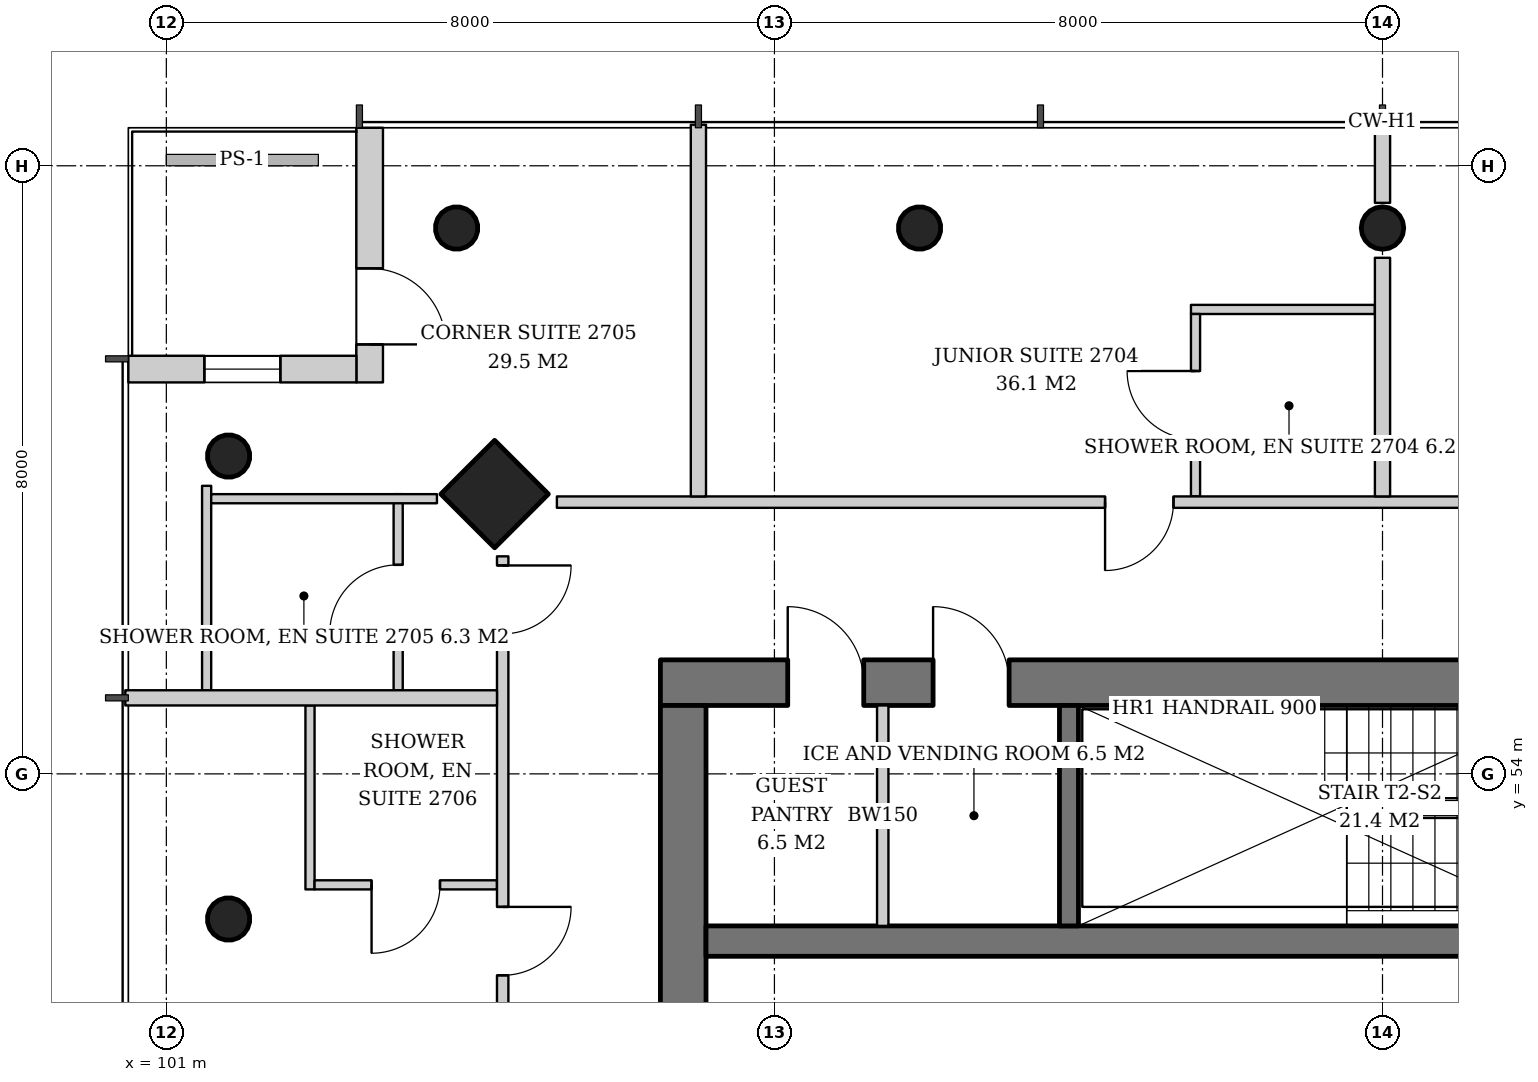
"""IFC4 building model, lengths in metres.
Left out: names, types, materials, properties, quantities, classifications, styles, units other than length and angle.
Written with IfcOpenShell. Run it as: python <this file> out.ifc"""

import sys

from ifc_helpers import new_model, si_unit, direction, frame, frame_2d, origin, origin_2d, place, context, subcontext, project, spatial, rectangle, hollow_circle, extrude, element, fill, save


model = new_model("IFC4")
c1 = context("Model", 3, precision=1e-05, world=origin(), true_north=direction((0.0, 1.0)))
c2 = subcontext(c1, "Body", "Model", "MODEL_VIEW")
j1 = project(units=[si_unit("LENGTHUNIT", "METRE"), si_unit("PLANEANGLEUNIT", "RADIAN")], contexts=[c1])
p1 = place(None, origin())
s1 = spatial("IfcSite", under=j1, at=p1, CompositionType="ELEMENT")
p2 = place(p1, origin())
s2 = spatial("IfcBuilding", under=s1, at=p2, CompositionType="ELEMENT")
p3 = place(p2, frame((0.0, 0.0, 108.4)))
s3 = spatial("IfcBuildingStorey", under=s2, at=p3, CompositionType="ELEMENT", Elevation=108.4)
p4 = place(p3, frame((105.267, 57.733, 0.0), z_axis=(0.043029647111, -0.043029647111, 0.998146732169), x_axis=(0.707106781187, 0.707106781187, 0.0)))
e1 = element("IfcColumn", 1, at=p4, inside=s3, PredefinedType="COLUMN", context=c2, shape_type="SweptSolid", body=[
    extrude(rectangle(XDim=1.0, YDim=1.0, at=origin_2d()), origin(), (0.0, 0.0, 1.0), 3.807),
])
p5 = place(p3, frame((104.767, 61.233, 0.0), z_axis=(0.043029647111, -0.043029647111, 0.998146732169), x_axis=(0.707106781187, 0.707106781187, 0.0)))
e2 = element("IfcColumn", 2, at=p5, inside=s3, PredefinedType="COLUMN", context=c2, shape_type="SweptSolid", body=[
    extrude(hollow_circle(Radius=0.28, WallThickness=0.02, at=origin_2d()), origin(), (0.0, 0.0, 1.0), 3.807),
])
p6 = place(p3, frame((117.0, 61.233, 0.0), z_axis=(0.0, -0.043069538298, 0.999072076915), x_axis=(1.0, 0.0, 0.0)))
e3 = element("IfcColumn", 3, at=p6, inside=s3, PredefinedType="COLUMN", context=c2, shape_type="SweptSolid", body=[
    extrude(hollow_circle(Radius=0.28, WallThickness=0.02, at=origin_2d()), origin(), (0.0, 0.0, 1.0), 3.803),
])
p7 = place(p3, frame((110.884, 61.233, 0.0), z_axis=(0.021561848751, -0.043059525333, 0.998839808957), x_axis=(0.894160516368, 0.44774654769, 0.0)))
e4 = element("IfcColumn", 4, at=p7, inside=s3, PredefinedType="COLUMN", context=c2, shape_type="SweptSolid", body=[
    extrude(hollow_circle(Radius=0.28, WallThickness=0.02, at=origin_2d()), origin(), (0.0, 0.0, 1.0), 3.804),
])
p8 = place(p3, frame((101.767, 58.233, 0.0), z_axis=(0.043029647111, -0.043029647111, 0.998146732169), x_axis=(0.707106781187, 0.707106781187, 0.0)))
e5 = element("IfcColumn", 5, at=p8, inside=s3, PredefinedType="COLUMN", context=c2, shape_type="SweptSolid", body=[
    extrude(hollow_circle(Radius=0.28, WallThickness=0.02, at=origin_2d()), origin(), (0.0, 0.0, 1.0), 3.807),
])
p9 = place(p3, frame((101.767, 52.116, 0.0), z_axis=(0.043059525333, -0.021561848751, 0.998839808957), x_axis=(0.44774654769, 0.894160516368, 0.0)))
e6 = element("IfcColumn", 6, at=p9, inside=s3, PredefinedType="COLUMN", context=c2, shape_type="SweptSolid", body=[
    extrude(hollow_circle(Radius=0.28, WallThickness=0.02, at=origin_2d()), origin(), (0.0, 0.0, 1.0), 3.804),
])
p10 = place(p3, frame((107.5, 55.2, 0.0), z_axis=(0.0, 0.0, 1.0), x_axis=(1.0, 0.0, 0.0)))
e7 = element("IfcWall", 7, at=p10, inside=s3, PredefinedType="SHEAR", context=c2, shape_type="SweptSolid", body=[
    extrude(rectangle(XDim=19.0, YDim=0.6, at=frame_2d((9.5, 0.0))), origin(), (0.0, 0.0, 1.0), 3.8),
])
p11 = place(p10, frame((14.14, 0.0, 0.0)))
e8 = element("IfcOpeningElement", 8, at=p11, cuts=e7, PredefinedType="OPENING", context=c2, shape_type="SweptSolid", body=[
    extrude(rectangle(XDim=1.0, YDim=2.1, at=frame_2d((0.5, 1.05))), frame((0.0, 0.31, 0.0), z_axis=(0.0, -1.0, 0.0), x_axis=(1.0, 0.0, 0.0)), (0.0, 0.0, 1.0), 0.62),
])
p12 = place(p10, frame((1.675, 0.0, 0.0)))
e9 = element("IfcOpeningElement", 9, at=p12, cuts=e7, PredefinedType="OPENING", context=c2, shape_type="SweptSolid", body=[
    extrude(rectangle(XDim=1.0, YDim=2.1, at=frame_2d((0.5, 1.05))), frame((0.0, 0.31, 0.0), z_axis=(0.0, -1.0, 0.0), x_axis=(1.0, 0.0, 0.0)), (0.0, 0.0, 1.0), 0.62),
])
p13 = place(p10, frame((3.587, 0.0, 0.0)))
e10 = element("IfcOpeningElement", 10, at=p13, cuts=e7, PredefinedType="OPENING", context=c2, shape_type="SweptSolid", body=[
    extrude(rectangle(XDim=1.0, YDim=2.1, at=frame_2d((0.5, 1.05))), frame((0.0, 0.31, 0.0), z_axis=(0.0, -1.0, 0.0), x_axis=(1.0, 0.0, 0.0)), (0.0, 0.0, 1.0), 0.62),
])
p14 = place(p3, frame((107.8, 37.1, 0.0), z_axis=(0.0, 0.0, 1.0), x_axis=(0.0, 1.0, 0.0)))
e11 = element("IfcWall", 11, at=p14, inside=s3, PredefinedType="SHEAR", context=c2, shape_type="SweptSolid", body=[
    extrude(rectangle(XDim=17.8, YDim=0.6, at=frame_2d((8.9, 0.0))), origin(), (0.0, 0.0, 1.0), 3.8),
])
p15 = place(p14, frame((8.0, 0.0, 0.0)))
e12 = element("IfcOpeningElement", 12, at=p15, cuts=e11, PredefinedType="OPENING", context=c2, shape_type="SweptSolid", body=[
    extrude(rectangle(XDim=1.8, YDim=2.4, at=frame_2d((0.9, 1.2))), frame((0.0, 0.31, 0.0), z_axis=(0.0, -1.0, 0.0), x_axis=(1.0, 0.0, 0.0)), (0.0, 0.0, 1.0), 0.62),
])
p16 = place(p3, frame((108.1, 51.8, 0.0), z_axis=(0.0, 0.0, 1.0), x_axis=(1.0, 0.0, 0.0)))
e13 = element("IfcWall", 13, at=p16, inside=s3, PredefinedType="SHEAR", context=c2, shape_type="SweptSolid", body=[
    extrude(rectangle(XDim=17.8, YDim=0.4, at=frame_2d((8.9, 0.0))), origin(), (0.0, 0.0, 1.0), 3.8),
])
p17 = place(p3, frame((103.675, 62.5, 0.0), z_axis=(0.0, 0.0, 1.0), x_axis=(0.0, -1.0, 0.0)))
e14 = element("IfcWall", 14, at=p17, inside=s3, PredefinedType="SOLIDWALL", context=c2, shape_type="SweptSolid", body=[
    extrude(rectangle(XDim=3.35, YDim=0.35, at=frame_2d((1.675, 0.0))), origin(), (0.0, 0.0, 1.0), 3.6),
])
p18 = place(p17, frame((1.85, 0.0, 0.0)))
e15 = element("IfcOpeningElement", 15, at=p18, cuts=e14, PredefinedType="OPENING", context=c2, shape_type="SweptSolid", body=[
    extrude(rectangle(XDim=1.0, YDim=2.4, at=frame_2d((0.5, 1.2))), frame((0.0, 0.185, 0.0), z_axis=(0.0, -1.0, 0.0), x_axis=(1.0, 0.0, 0.0)), (0.0, 0.0, 1.0), 0.37),
])
p19 = place(p3, frame((103.5, 59.325, 0.0), z_axis=(0.0, 0.0, 1.0), x_axis=(-1.0, 0.0, 0.0)))
e16 = element("IfcWall", 16, at=p19, inside=s3, PredefinedType="SOLIDWALL", context=c2, shape_type="SweptSolid", body=[
    extrude(rectangle(XDim=3.0, YDim=0.35, at=frame_2d((1.5, 0.0))), origin(), (0.0, 0.0, 1.0), 3.6),
])
p20 = place(p19, frame((1.0, 0.0, 0.9)))
e17 = element("IfcOpeningElement", 17, at=p20, cuts=e16, PredefinedType="OPENING", context=c2, shape_type="SweptSolid", body=[
    extrude(rectangle(XDim=1.0, YDim=2.4, at=frame_2d((0.5, 1.2))), frame((0.0, 0.185, 0.0), z_axis=(0.0, -1.0, 0.0), x_axis=(1.0, 0.0, 0.0)), (0.0, 0.0, 1.0), 0.37),
])
p21 = place(p3, frame((112.875, 52.0, 0.0), z_axis=(0.0, 0.0, 1.0), x_axis=(0.0, 1.0, 0.0)))
e18 = element("IfcWall", 18, at=p21, inside=s3, PredefinedType="SHEAR", context=c2, shape_type="SweptSolid", body=[
    extrude(rectangle(XDim=2.9, YDim=0.25, at=frame_2d((1.45, 0.0))), origin(), (0.0, 0.0, 1.0), 3.8),
])
p22 = place(p3, frame((110.425, 52.0, 0.0), z_axis=(0.0, 0.0, 1.0), x_axis=(0.0, 1.0, 0.0)))
e19 = element("IfcWall", 19, at=p22, inside=s3, PredefinedType="SOLIDWALL", context=c2, shape_type="SweptSolid", body=[
    extrude(rectangle(XDim=2.9, YDim=0.15, at=frame_2d((1.45, 0.0))), origin(), (0.0, 0.0, 1.0), 3.6),
])
p23 = place(p3, frame((116.9, 60.11, 0.0), z_axis=(0.0, 0.0, 1.0), x_axis=(-1.0, 0.0, 0.0)))
e20 = element("IfcWall", 20, at=p23, inside=s3, PredefinedType="PARTITIONING", context=c2, shape_type="SweptSolid", body=[
    extrude(rectangle(XDim=2.42, YDim=0.12, at=frame_2d((1.21, 0.0))), origin(), (0.0, 0.0, 1.0), 3.6),
])
p24 = place(p3, frame((114.54, 57.65, 0.0), z_axis=(0.0, 0.0, 1.0), x_axis=(0.0, 1.0, 0.0)))
e21 = element("IfcWall", 21, at=p24, inside=s3, PredefinedType="PARTITIONING", context=c2, shape_type="SweptSolid", body=[
    extrude(rectangle(XDim=2.4, YDim=0.12, at=frame_2d((1.2, 0.0))), origin(), (0.0, 0.0, 1.0), 3.6),
])
p25 = place(p24, frame((0.75, 0.0, 0.0)))
e22 = element("IfcOpeningElement", 22, at=p25, cuts=e21, PredefinedType="OPENING", context=c2, shape_type="SweptSolid", body=[
    extrude(rectangle(XDim=0.9, YDim=2.1, at=frame_2d((0.45, 1.05))), frame((0.0, 0.07, 0.0), z_axis=(0.0, -1.0, 0.0), x_axis=(1.0, 0.0, 0.0)), (0.0, 0.0, 1.0), 0.14),
])
p26 = place(p3, frame((127.862, 57.575, 0.0), z_axis=(0.0, 0.0, 1.0), x_axis=(-1.0, 0.0, 0.0)))
e23 = element("IfcWall", 23, at=p26, inside=s3, PredefinedType="PARTITIONING", context=c2, shape_type="SweptSolid", body=[
    extrude(rectangle(XDim=21.724, YDim=0.15, at=frame_2d((10.862, 0.0))), origin(), (0.0, 0.0, 1.0), 2.9),
])
p27 = place(p26, frame((0.12, 0.0, 0.0)))
e24 = element("IfcOpeningElement", 24, at=p27, cuts=e23, PredefinedType="OPENING", context=c2, shape_type="SweptSolid", body=[
    extrude(rectangle(XDim=0.9, YDim=2.1, at=frame_2d((0.45, 1.05))), frame((0.0, 0.085, 0.0), z_axis=(0.0, -1.0, 0.0), x_axis=(1.0, 0.0, 0.0)), (0.0, 0.0, 1.0), 0.17),
])
p28 = place(p26, frame((4.562, 0.0, 0.0)))
e25 = element("IfcOpeningElement", 25, at=p28, cuts=e23, PredefinedType="OPENING", context=c2, shape_type="SweptSolid", body=[
    extrude(rectangle(XDim=1.0, YDim=2.1, at=frame_2d((0.5, 1.05))), frame((0.0, 0.085, 0.0), z_axis=(0.0, -1.0, 0.0), x_axis=(1.0, 0.0, 0.0)), (0.0, 0.0, 1.0), 0.17),
])
p29 = place(p26, frame((13.612, 0.0, 0.0)))
e26 = element("IfcOpeningElement", 26, at=p29, cuts=e23, PredefinedType="OPENING", context=c2, shape_type="SweptSolid", body=[
    extrude(rectangle(XDim=0.9, YDim=2.1, at=frame_2d((0.45, 1.05))), frame((0.0, 0.085, 0.0), z_axis=(0.0, -1.0, 0.0), x_axis=(1.0, 0.0, 0.0)), (0.0, 0.0, 1.0), 0.17),
])
p30 = place(p3, frame((117.0, 57.65, 0.0), z_axis=(0.0, 0.0, 1.0), x_axis=(0.0, 1.0, 0.0)))
e27 = element("IfcWall", 27, at=p30, inside=s3, PredefinedType="PARTITIONING", context=c2, shape_type="SweptSolid", body=[
    extrude(rectangle(XDim=3.14, YDim=0.2, at=frame_2d((1.57, 0.0))), origin(), (0.0, 0.0, 1.0), 3.6),
])
p31 = place(p3, frame((117.0, 61.512, 0.0), z_axis=(0.0, 0.0, 1.0), x_axis=(0.0, 1.0, 0.0)))
e28 = element("IfcWall", 28, at=p31, inside=s3, PredefinedType="PARTITIONING", context=c2, shape_type="SweptSolid", body=[
    extrude(rectangle(XDim=1.028, YDim=0.2, at=frame_2d((0.514, 0.0))), origin(), (0.0, 0.0, 1.0), 3.6),
])
p32 = place(p3, frame((108.0, 57.65, 0.0), z_axis=(0.0, 0.0, 1.0), x_axis=(0.0, 1.0, 0.0)))
e29 = element("IfcWall", 29, at=p32, inside=s3, PredefinedType="PARTITIONING", context=c2, shape_type="SweptSolid", body=[
    extrude(rectangle(XDim=4.89, YDim=0.2, at=frame_2d((2.445, 0.0))), origin(), (0.0, 0.0, 1.0), 3.2),
])
p33 = place(p3, frame((104.05, 55.1, 0.0), z_axis=(0.0, 0.0, 1.0), x_axis=(0.0, 1.0, 0.0)))
e30 = element("IfcWall", 30, at=p33, inside=s3, PredefinedType="PARTITIONING", context=c2, shape_type="SweptSolid", body=[
    extrude(rectangle(XDim=2.58, YDim=0.12, at=frame_2d((1.29, 0.0))), origin(), (0.0, 0.0, 1.0), 2.9),
])
p34 = place(p33, frame((0.75, 0.0, 0.0)))
e31 = element("IfcOpeningElement", 31, at=p34, cuts=e30, PredefinedType="OPENING", context=c2, shape_type="SweptSolid", body=[
    extrude(rectangle(XDim=0.9, YDim=2.1, at=frame_2d((0.45, 1.05))), frame((0.0, 0.07, 0.0), z_axis=(0.0, -1.0, 0.0), x_axis=(1.0, 0.0, 0.0)), (0.0, 0.0, 1.0), 0.14),
])
p35 = place(p3, frame((101.53, 55.1, 0.0), z_axis=(0.0, 0.0, 1.0), x_axis=(0.0, 1.0, 0.0)))
e32 = element("IfcWall", 32, at=p35, inside=s3, PredefinedType="PARTITIONING", context=c2, shape_type="SweptSolid", body=[
    extrude(rectangle(XDim=2.689, YDim=0.12, at=frame_2d((1.345, 0.0))), origin(), (0.0, 0.0, 1.0), 3.6),
])
p36 = place(p3, frame((104.56, 57.62, 0.0), z_axis=(0.0, 0.0, 1.0), x_axis=(-1.0, 0.0, 0.0)))
e33 = element("IfcWall", 33, at=p36, inside=s3, PredefinedType="PARTITIONING", context=c2, shape_type="SweptSolid", body=[
    extrude(rectangle(XDim=2.97, YDim=0.12, at=frame_2d((1.485, 0.0))), origin(), (0.0, 0.0, 1.0), 3.2),
])
p37 = place(p3, frame((102.89, 54.9, 0.0), z_axis=(0.0, 0.0, 1.0), x_axis=(0.0, -1.0, 0.0)))
e34 = element("IfcWall", 34, at=p37, inside=s3, PredefinedType="PARTITIONING", context=c2, shape_type="SweptSolid", body=[
    extrude(rectangle(XDim=2.42, YDim=0.12, at=frame_2d((1.21, 0.0))), origin(), (0.0, 0.0, 1.0), 3.6),
])
p38 = place(p3, frame((105.35, 52.54, 0.0), z_axis=(0.0, 0.0, 1.0), x_axis=(-1.0, 0.0, 0.0)))
e35 = element("IfcWall", 35, at=p38, inside=s3, PredefinedType="PARTITIONING", context=c2, shape_type="SweptSolid", body=[
    extrude(rectangle(XDim=2.4, YDim=0.12, at=frame_2d((1.2, 0.0))), origin(), (0.0, 0.0, 1.0), 3.6),
])
p39 = place(p38, frame((0.75, 0.0, 0.0)))
e36 = element("IfcOpeningElement", 36, at=p39, cuts=e35, PredefinedType="OPENING", context=c2, shape_type="SweptSolid", body=[
    extrude(rectangle(XDim=0.9, YDim=2.1, at=frame_2d((0.45, 1.05))), frame((0.0, 0.07, 0.0), z_axis=(0.0, -1.0, 0.0), x_axis=(1.0, 0.0, 0.0)), (0.0, 0.0, 1.0), 0.14),
])
p40 = place(p3, frame((105.425, 56.862, 0.0), z_axis=(0.0, 0.0, 1.0), x_axis=(0.0, -1.0, 0.0)))
e37 = element("IfcWall", 37, at=p40, inside=s3, PredefinedType="PARTITIONING", context=c2, shape_type="SweptSolid", body=[
    extrude(rectangle(XDim=21.724, YDim=0.15, at=frame_2d((10.862, 0.0))), origin(), (0.0, 0.0, 1.0), 2.9),
])
p41 = place(p40, frame((0.12, 0.0, 0.0)))
e38 = element("IfcOpeningElement", 38, at=p41, cuts=e37, PredefinedType="OPENING", context=c2, shape_type="SweptSolid", body=[
    extrude(rectangle(XDim=0.9, YDim=2.1, at=frame_2d((0.45, 1.05))), frame((0.0, 0.085, 0.0), z_axis=(0.0, -1.0, 0.0), x_axis=(1.0, 0.0, 0.0)), (0.0, 0.0, 1.0), 0.17),
])
p42 = place(p40, frame((4.612, 0.0, 0.0)))
e39 = element("IfcOpeningElement", 39, at=p42, cuts=e37, PredefinedType="OPENING", context=c2, shape_type="SweptSolid", body=[
    extrude(rectangle(XDim=0.9, YDim=2.1, at=frame_2d((0.45, 1.05))), frame((0.0, 0.085, 0.0), z_axis=(0.0, -1.0, 0.0), x_axis=(1.0, 0.0, 0.0)), (0.0, 0.0, 1.0), 0.17),
])
p43 = place(p40, frame((13.612, 0.0, 0.0)))
e40 = element("IfcOpeningElement", 40, at=p43, cuts=e37, PredefinedType="OPENING", context=c2, shape_type="SweptSolid", body=[
    extrude(rectangle(XDim=0.9, YDim=2.1, at=frame_2d((0.45, 1.05))), frame((0.0, 0.085, 0.0), z_axis=(0.0, -1.0, 0.0), x_axis=(1.0, 0.0, 0.0)), (0.0, 0.0, 1.0), 0.17),
])
p44 = place(p3, frame((105.35, 55.0, 0.0), z_axis=(0.0, 0.0, 1.0), x_axis=(-1.0, 0.0, 0.0)))
e41 = element("IfcWall", 41, at=p44, inside=s3, PredefinedType="PARTITIONING", context=c2, shape_type="SweptSolid", body=[
    extrude(rectangle(XDim=4.89, YDim=0.2, at=frame_2d((2.445, 0.0))), origin(), (0.0, 0.0, 1.0), 2.9),
])
p45 = place(p18, origin())
e42 = element("IfcDoor", 42, at=p45, inside=s3, OperationType="SINGLE_SWING_RIGHT", PredefinedType="DOOR", context=c2, shape_type="SweptSolid", body=[
    extrude(rectangle(XDim=1.0, YDim=2.4, at=frame_2d((0.5, 1.2))), frame((0.0, 0.025, 0.0), z_axis=(0.0, -1.0, 0.0), x_axis=(1.0, 0.0, 0.0)), (0.0, 0.0, 1.0), 0.05),
])
fill(e15, e42)
p46 = place(p20, origin())
e43 = element("IfcWindow", 43, at=p46, inside=s3, PartitioningType="SINGLE_PANEL", PredefinedType="WINDOW", context=c2, shape_type="SweptSolid", body=[
    extrude(rectangle(XDim=1.0, YDim=2.4, at=frame_2d((0.5, 1.2))), frame((0.0, 0.03, 0.0), z_axis=(0.0, -1.0, 0.0), x_axis=(1.0, 0.0, 0.0)), (0.0, 0.0, 1.0), 0.06),
])
fill(e17, e43)
p47 = place(p12, origin())
e44 = element("IfcDoor", 44, at=p47, inside=s3, OperationType="SINGLE_SWING_LEFT", PredefinedType="DOOR", context=c2, shape_type="SweptSolid", body=[
    extrude(rectangle(XDim=1.0, YDim=2.1, at=frame_2d((0.5, 1.05))), frame((0.0, -0.24, 0.0), z_axis=(0.0, -1.0, 0.0), x_axis=(1.0, 0.0, 0.0)), (0.0, 0.0, 1.0), 0.05),
])
fill(e9, e44)
p48 = place(p13, origin())
e45 = element("IfcDoor", 45, at=p48, inside=s3, OperationType="SINGLE_SWING_LEFT", PredefinedType="DOOR", context=c2, shape_type="SweptSolid", body=[
    extrude(rectangle(XDim=1.0, YDim=2.1, at=frame_2d((0.5, 1.05))), frame((0.0, -0.24, 0.0), z_axis=(0.0, -1.0, 0.0), x_axis=(1.0, 0.0, 0.0)), (0.0, 0.0, 1.0), 0.05),
])
fill(e10, e45)
p49 = place(p25, origin())
e46 = element("IfcDoor", 46, at=p49, inside=s3, OperationType="SINGLE_SWING_RIGHT", PredefinedType="DOOR", context=c2, shape_type="SweptSolid", body=[
    extrude(rectangle(XDim=0.9, YDim=2.1, at=frame_2d((0.45, 1.05))), frame((0.0, 0.025, 0.0), z_axis=(0.0, -1.0, 0.0), x_axis=(1.0, 0.0, 0.0)), (0.0, 0.0, 1.0), 0.05),
])
fill(e22, e46)
p50 = place(p29, origin())
e47 = element("IfcDoor", 47, at=p50, inside=s3, OperationType="SINGLE_SWING_RIGHT", PredefinedType="DOOR", context=c2, shape_type="SweptSolid", body=[
    extrude(rectangle(XDim=0.9, YDim=2.1, at=frame_2d((0.45, 1.05))), frame((0.0, 0.025, 0.0), z_axis=(0.0, -1.0, 0.0), x_axis=(1.0, 0.0, 0.0)), (0.0, 0.0, 1.0), 0.05),
])
fill(e26, e47)
p51 = place(p34, origin())
e48 = element("IfcDoor", 48, at=p51, inside=s3, OperationType="SINGLE_SWING_LEFT", PredefinedType="DOOR", context=c2, shape_type="SweptSolid", body=[
    extrude(rectangle(XDim=0.9, YDim=2.1, at=frame_2d((0.45, 1.05))), frame((0.0, 0.025, 0.0), z_axis=(0.0, -1.0, 0.0), x_axis=(1.0, 0.0, 0.0)), (0.0, 0.0, 1.0), 0.05),
])
fill(e31, e48)
p52 = place(p39, origin())
e49 = element("IfcDoor", 49, at=p52, inside=s3, OperationType="SINGLE_SWING_RIGHT", PredefinedType="DOOR", context=c2, shape_type="SweptSolid", body=[
    extrude(rectangle(XDim=0.9, YDim=2.1, at=frame_2d((0.45, 1.05))), frame((0.0, 0.025, 0.0), z_axis=(0.0, -1.0, 0.0), x_axis=(1.0, 0.0, 0.0)), (0.0, 0.0, 1.0), 0.05),
])
fill(e36, e49)
p53 = place(p41, origin())
e50 = element("IfcDoor", 50, at=p53, inside=s3, OperationType="SINGLE_SWING_LEFT", PredefinedType="DOOR", context=c2, shape_type="SweptSolid", body=[
    extrude(rectangle(XDim=0.9, YDim=2.1, at=frame_2d((0.45, 1.05))), frame((0.0, 0.025, 0.0), z_axis=(0.0, -1.0, 0.0), x_axis=(1.0, 0.0, 0.0)), (0.0, 0.0, 1.0), 0.05),
])
fill(e38, e50)
p54 = place(p42, origin())
e51 = element("IfcDoor", 51, at=p54, inside=s3, OperationType="SINGLE_SWING_LEFT", PredefinedType="DOOR", context=c2, shape_type="SweptSolid", body=[
    extrude(rectangle(XDim=0.9, YDim=2.1, at=frame_2d((0.45, 1.05))), frame((0.0, 0.025, 0.0), z_axis=(0.0, -1.0, 0.0), x_axis=(1.0, 0.0, 0.0)), (0.0, 0.0, 1.0), 0.05),
])
fill(e39, e51)
save(model, sys.argv[1])
